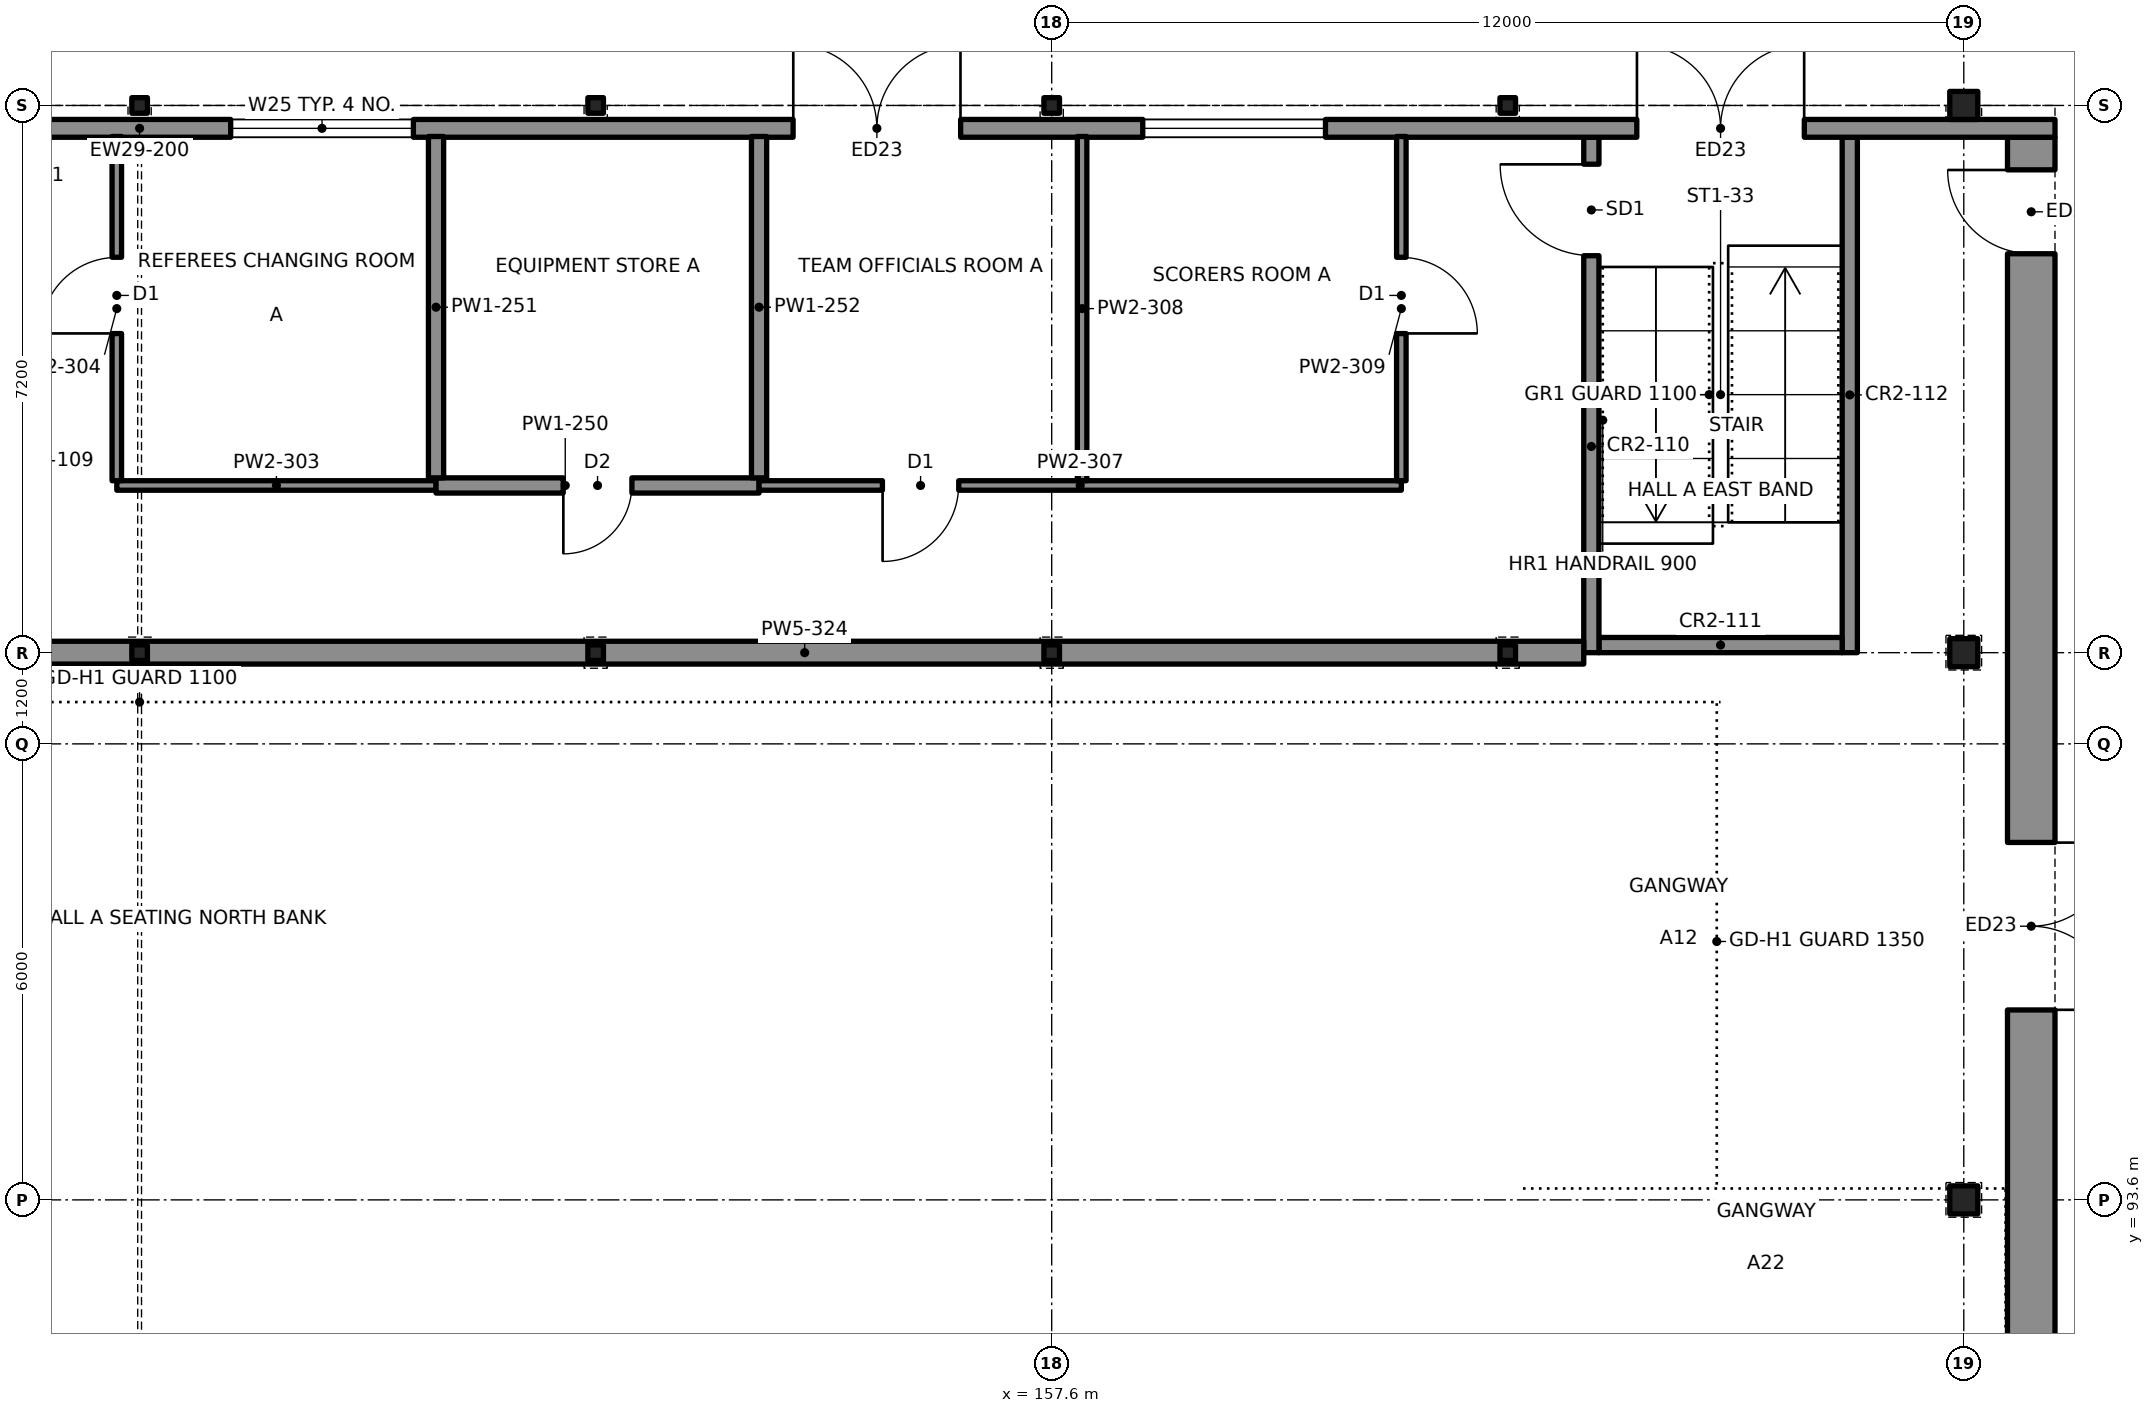
"""IFC4 building model, lengths in metres.
Left out: names, types, materials, properties, quantities, classifications, styles, units other than length and angle.
Written with IfcOpenShell. Run it as: python <this file> out.ifc"""

import sys

from ifc_helpers import new_model, si_unit, direction, frame, frame_2d, origin, origin_2d, place, context, subcontext, project, spatial, rectangle, i_section, extrude, element, fill, save


model = new_model("IFC4")
c1 = context("Model", 3, precision=1e-05, world=origin(), true_north=direction((0.0, 1.0)))
c2 = subcontext(c1, "Body", "Model", "MODEL_VIEW")
j1 = project(units=[si_unit("LENGTHUNIT", "METRE"), si_unit("PLANEANGLEUNIT", "RADIAN")], contexts=[c1])
p1 = place(None, origin())
s1 = spatial("IfcSite", under=j1, at=p1, CompositionType="ELEMENT")
p2 = place(p1, origin())
s2 = spatial("IfcBuilding", under=s1, at=p2, CompositionType="ELEMENT")
p3 = place(p2, origin())
s3 = spatial("IfcBuildingStorey", under=s2, at=p3, CompositionType="ELEMENT", Elevation=0.0)
for number, where, z_axis, x_axis in (
    (1, (169.6, 93.6, -0.5), (0.0, 0.0, 1.0), (1.0, 0.0, 0.0)),
    (2, (169.6, 100.8, -0.5), (0.0, 0.0, 1.0), (1.0, 0.0, 0.0)),
    (3, (169.6, 108.0, -0.5), (0.0, 0.0, 1.0), (1.0, 0.0, 0.0)),
):
    element("IfcColumn", number, at=place(p3, frame(where, z_axis=z_axis, x_axis=x_axis)), inside=s3, PredefinedType="COLUMN", context=c2, shape_type="SweptSolid", body=[
        extrude(i_section(OverallWidth=0.369, OverallDepth=0.356, WebThickness=0.011, FlangeThickness=0.018, at=origin_2d()), origin(), (0.0, 0.0, 1.0), 4.9),
    ])
for number, where, z_axis, x_axis in (
    (4, (145.6, 100.8, -0.5), (0.0, 0.0, 1.0), (1.0, 0.0, 0.0)),
    (5, (145.6, 108.0, -0.5), (0.0, 0.0, 1.0), (1.0, 0.0, 0.0)),
    (6, (151.6, 100.8, -0.5), (0.0, 0.0, 1.0), (1.0, 0.0, 0.0)),
    (7, (151.6, 108.0, -0.5), (0.0, 0.0, 1.0), (1.0, 0.0, 0.0)),
    (8, (157.6, 100.8, -0.5), (0.0, 0.0, 1.0), (1.0, 0.0, 0.0)),
    (9, (157.6, 108.0, -0.5), (0.0, 0.0, 1.0), (1.0, 0.0, 0.0)),
    (10, (163.6, 100.8, -0.5), (0.0, 0.0, 1.0), (1.0, 0.0, 0.0)),
    (11, (163.6, 108.0, -0.5), (0.0, 0.0, 1.0), (1.0, 0.0, 0.0)),
):
    element("IfcColumn", number, at=place(p3, frame(where, z_axis=z_axis, x_axis=x_axis)), inside=s3, PredefinedType="COLUMN", context=c2, shape_type="SweptSolid", body=[
        extrude(i_section(OverallWidth=0.205, OverallDepth=0.31, WebThickness=0.01, FlangeThickness=0.016, at=origin_2d()), origin(), (0.0, 0.0, 1.0), 4.9),
    ])
p4 = place(p3, frame((170.488, 72.418, 0.0), z_axis=(0.0, 0.0, 1.0), x_axis=(0.0, 1.0, 0.0)))
e12 = element("IfcWall", 12, at=p4, inside=s3, PredefinedType="SOLIDWALL", context=c2, shape_type="SweptSolid", body=[
    extrude(rectangle(XDim=35.163, YDim=0.625, at=frame_2d((17.582, 0.0))), origin(), (0.0, 0.0, 1.0), 4.4),
])
p5 = place(p4, frame((23.683, 0.0, 0.0)))
e13 = element("IfcOpeningElement", 13, at=p5, cuts=e12, PredefinedType="OPENING", context=c2, shape_type="SweptSolid", body=[
    extrude(rectangle(XDim=2.2, YDim=2.4, at=frame_2d((1.1, 1.2))), frame((0.0, 0.323, 0.0), z_axis=(0.0, -1.0, 0.0), x_axis=(1.0, 0.0, 0.0)), (0.0, 0.0, 1.0), 0.645),
])
p6 = place(p4, frame((33.633, 0.0, 0.0)))
e14 = element("IfcOpeningElement", 14, at=p6, cuts=e12, PredefinedType="OPENING", context=c2, shape_type="SweptSolid", body=[
    extrude(rectangle(XDim=1.1, YDim=2.4, at=frame_2d((0.55, 1.2))), frame((0.0, 0.323, 0.0), z_axis=(0.0, -1.0, 0.0), x_axis=(1.0, 0.0, 0.0)), (0.0, 0.0, 1.0), 0.645),
])
p7 = place(p3, frame((120.4, 107.699, 0.0), z_axis=(0.0, 0.0, 1.0), x_axis=(1.0, 0.0, 0.0)))
e15 = element("IfcWall", 15, at=p7, inside=s3, PredefinedType="SOLIDWALL", context=c2, shape_type="SweptSolid", body=[
    extrude(rectangle(XDim=50.4, YDim=0.234, at=frame_2d((25.2, 0.0))), origin(), (0.0, 0.0, 1.0), 4.4),
])
p8 = place(p7, frame((9.6, 0.0, 1.0)))
e16 = element("IfcOpeningElement", 16, at=p8, cuts=e15, PredefinedType="OPENING", context=c2, shape_type="SweptSolid", body=[
    extrude(rectangle(XDim=2.4, YDim=2.4, at=frame_2d((1.2, 1.2))), frame((0.0, 0.127, 0.0), z_axis=(0.0, -1.0, 0.0), x_axis=(1.0, 0.0, 0.0)), (0.0, 0.0, 1.0), 0.254),
])
p9 = place(p7, frame((21.6, 0.0, 1.0)))
e17 = element("IfcOpeningElement", 17, at=p9, cuts=e15, PredefinedType="OPENING", context=c2, shape_type="SweptSolid", body=[
    extrude(rectangle(XDim=2.4, YDim=2.4, at=frame_2d((1.2, 1.2))), frame((0.0, 0.127, 0.0), z_axis=(0.0, -1.0, 0.0), x_axis=(1.0, 0.0, 0.0)), (0.0, 0.0, 1.0), 0.254),
])
p10 = place(p7, frame((26.4, 0.0, 1.0)))
e18 = element("IfcOpeningElement", 18, at=p10, cuts=e15, PredefinedType="OPENING", context=c2, shape_type="SweptSolid", body=[
    extrude(rectangle(XDim=2.4, YDim=2.4, at=frame_2d((1.2, 1.2))), frame((0.0, 0.127, 0.0), z_axis=(0.0, -1.0, 0.0), x_axis=(1.0, 0.0, 0.0)), (0.0, 0.0, 1.0), 0.254),
])
p11 = place(p7, frame((38.4, 0.0, 1.0)))
e19 = element("IfcOpeningElement", 19, at=p11, cuts=e15, PredefinedType="OPENING", context=c2, shape_type="SweptSolid", body=[
    extrude(rectangle(XDim=2.4, YDim=2.4, at=frame_2d((1.2, 1.2))), frame((0.0, 0.127, 0.0), z_axis=(0.0, -1.0, 0.0), x_axis=(1.0, 0.0, 0.0)), (0.0, 0.0, 1.0), 0.254),
])
p12 = place(p7, frame((14.4, 0.0, 0.0)))
e20 = element("IfcOpeningElement", 20, at=p12, cuts=e15, PredefinedType="OPENING", context=c2, shape_type="SweptSolid", body=[
    extrude(rectangle(XDim=2.2, YDim=2.4, at=frame_2d((1.1, 1.2))), frame((0.0, 0.127, 0.0), z_axis=(0.0, -1.0, 0.0), x_axis=(1.0, 0.0, 0.0)), (0.0, 0.0, 1.0), 0.254),
])
p13 = place(p7, frame((33.8, 0.0, 0.0)))
e21 = element("IfcOpeningElement", 21, at=p13, cuts=e15, PredefinedType="OPENING", context=c2, shape_type="SweptSolid", body=[
    extrude(rectangle(XDim=2.2, YDim=2.4, at=frame_2d((1.1, 1.2))), frame((0.0, 0.127, 0.0), z_axis=(0.0, -1.0, 0.0), x_axis=(1.0, 0.0, 0.0)), (0.0, 0.0, 1.0), 0.254),
])
p14 = place(p7, frame((2.9, 0.0, 0.0)))
e22 = element("IfcOpeningElement", 22, at=p14, cuts=e15, PredefinedType="OPENING", context=c2, shape_type="SweptSolid", body=[
    extrude(rectangle(XDim=2.2, YDim=2.4, at=frame_2d((1.1, 1.2))), frame((0.0, 0.127, 0.0), z_axis=(0.0, -1.0, 0.0), x_axis=(1.0, 0.0, 0.0)), (0.0, 0.0, 1.0), 0.254),
])
p15 = place(p7, frame((44.9, 0.0, 0.0)))
e23 = element("IfcOpeningElement", 23, at=p15, cuts=e15, PredefinedType="OPENING", context=c2, shape_type="SweptSolid", body=[
    extrude(rectangle(XDim=2.2, YDim=2.4, at=frame_2d((1.1, 1.2))), frame((0.0, 0.127, 0.0), z_axis=(0.0, -1.0, 0.0), x_axis=(1.0, 0.0, 0.0)), (0.0, 0.0, 1.0), 0.254),
])
p16 = place(p3, frame((164.7, 100.8, 0.0), z_axis=(0.0, 0.0, 1.0), x_axis=(0.0, 1.0, 0.0)))
e24 = element("IfcWall", 24, at=p16, inside=s3, PredefinedType="SOLIDWALL", context=c2, shape_type="SweptSolid", body=[
    extrude(rectangle(XDim=6.783, YDim=0.2, at=frame_2d((3.392, 0.0))), origin(), (0.0, 0.0, 1.0), 4.4),
])
p17 = place(p16, frame((5.225, 0.0, 0.0)))
e25 = element("IfcOpeningElement", 25, at=p17, cuts=e24, PredefinedType="OPENING", context=c2, shape_type="SweptSolid", body=[
    extrude(rectangle(XDim=1.2, YDim=2.1, at=frame_2d((0.6, 1.05))), frame((0.0, 0.11, 0.0), z_axis=(0.0, -1.0, 0.0), x_axis=(1.0, 0.0, 0.0)), (0.0, 0.0, 1.0), 0.22),
])
p18 = place(p3, frame((168.1, 100.8, 0.0), z_axis=(0.0, 0.0, 1.0), x_axis=(0.0, 1.0, 0.0)))
e26 = element("IfcWall", 26, at=p18, inside=s3, PredefinedType="SOLIDWALL", context=c2, shape_type="SweptSolid", body=[
    extrude(rectangle(XDim=6.783, YDim=0.2, at=frame_2d((3.392, 0.0))), origin(), (0.0, 0.0, 1.0), 4.4),
])
p19 = place(p3, frame((164.8, 100.9, 0.0), z_axis=(0.0, 0.0, 1.0), x_axis=(1.0, 0.0, 0.0)))
e27 = element("IfcWall", 27, at=p19, inside=s3, PredefinedType="SOLIDWALL", context=c2, shape_type="SweptSolid", body=[
    extrude(rectangle(XDim=3.2, YDim=0.2, at=frame_2d((1.6, 0.0))), origin(), (0.0, 0.0, 1.0), 4.4),
])
p20 = place(p3, frame((144.1, 100.8, 0.0), z_axis=(0.0, 0.0, 1.0), x_axis=(1.0, 0.0, 0.0)))
e28 = element("IfcWall", 28, at=p20, inside=s3, PredefinedType="PARTITIONING", context=c2, shape_type="SweptSolid", body=[
    extrude(rectangle(XDim=20.5, YDim=0.3, at=frame_2d((10.25, 0.0))), origin(), (0.0, 0.0, 1.0), 3.8),
])
p21 = place(p3, frame((145.3, 103.0, 0.0), z_axis=(0.0, 0.0, 1.0), x_axis=(1.0, 0.0, 0.0)))
e29 = element("IfcWall", 29, at=p21, inside=s3, PredefinedType="PARTITIONING", context=c2, shape_type="SweptSolid", body=[
    extrude(rectangle(XDim=4.2, YDim=0.125, at=frame_2d((2.1, 0.0))), origin(), (0.0, 0.0, 1.0), 3.65),
])
p22 = place(p3, frame((149.5, 103.0, 0.0), z_axis=(0.0, 0.0, 1.0), x_axis=(1.0, 0.0, 0.0)))
e30 = element("IfcWall", 30, at=p22, inside=s3, PredefinedType="PARTITIONING", context=c2, shape_type="SweptSolid", body=[
    extrude(rectangle(XDim=4.25, YDim=0.2, at=frame_2d((2.125, 0.0))), origin(), (0.0, 0.0, 1.0), 3.65),
])
p23 = place(p22, frame((1.675, 0.0, 0.0)))
e31 = element("IfcOpeningElement", 31, at=p23, cuts=e30, PredefinedType="OPENING", context=c2, shape_type="SweptSolid", body=[
    extrude(rectangle(XDim=0.9, YDim=2.1, at=frame_2d((0.45, 1.05))), frame((0.0, 0.11, 0.0), z_axis=(0.0, -1.0, 0.0), x_axis=(1.0, 0.0, 0.0)), (0.0, 0.0, 1.0), 0.22),
])
p24 = place(p3, frame((153.75, 103.0, 0.0), z_axis=(0.0, 0.0, 1.0), x_axis=(1.0, 0.0, 0.0)))
e32 = element("IfcWall", 32, at=p24, inside=s3, PredefinedType="PARTITIONING", context=c2, shape_type="SweptSolid", body=[
    extrude(rectangle(XDim=8.45, YDim=0.125, at=frame_2d((4.225, 0.0))), origin(), (0.0, 0.0, 1.0), 3.65),
])
p25 = place(p24, frame((1.625, 0.0, 0.0)))
e33 = element("IfcOpeningElement", 33, at=p25, cuts=e32, PredefinedType="OPENING", context=c2, shape_type="SweptSolid", body=[
    extrude(rectangle(XDim=1.0, YDim=2.1, at=frame_2d((0.5, 1.05))), frame((0.0, 0.073, 0.0), z_axis=(0.0, -1.0, 0.0), x_axis=(1.0, 0.0, 0.0)), (0.0, 0.0, 1.0), 0.145),
])
p26 = place(p3, frame((145.3, 103.062, 0.0), z_axis=(0.0, 0.0, 1.0), x_axis=(0.0, 1.0, 0.0)))
e34 = element("IfcWall", 34, at=p26, inside=s3, PredefinedType="PARTITIONING", context=c2, shape_type="SweptSolid", body=[
    extrude(rectangle(XDim=4.529, YDim=0.125, at=frame_2d((2.265, 0.0))), origin(), (0.0, 0.0, 1.0), 3.65),
])
p27 = place(p26, frame((1.938, 0.0, 0.0)))
e35 = element("IfcOpeningElement", 35, at=p27, cuts=e34, PredefinedType="OPENING", context=c2, shape_type="SweptSolid", body=[
    extrude(rectangle(XDim=1.0, YDim=2.1, at=frame_2d((0.5, 1.05))), frame((0.0, 0.073, 0.0), z_axis=(0.0, -1.0, 0.0), x_axis=(1.0, 0.0, 0.0)), (0.0, 0.0, 1.0), 0.145),
])
for number, where, z_axis, x_axis in (
    (36, (149.5, 103.1, 0.0), (0.0, 0.0, 1.0), (0.0, 1.0, 0.0)),
    (37, (153.75, 103.1, 0.0), (0.0, 0.0, 1.0), (0.0, 1.0, 0.0)),
):
    element("IfcWall", number, at=place(p3, frame(where, z_axis=z_axis, x_axis=x_axis)), inside=s3, PredefinedType="PARTITIONING", context=c2, shape_type="SweptSolid", body=[
        extrude(rectangle(XDim=4.491, YDim=0.2, at=frame_2d((2.246, 0.0))), origin(), (0.0, 0.0, 1.0), 3.65),
    ])
p28 = place(p3, frame((158.0, 103.062, 0.0), z_axis=(0.0, 0.0, 1.0), x_axis=(0.0, 1.0, 0.0)))
e38 = element("IfcWall", 38, at=p28, inside=s3, PredefinedType="PARTITIONING", context=c2, shape_type="SweptSolid", body=[
    extrude(rectangle(XDim=4.529, YDim=0.125, at=frame_2d((2.265, 0.0))), origin(), (0.0, 0.0, 1.0), 3.65),
])
p29 = place(p3, frame((162.2, 103.062, 0.0), z_axis=(0.0, 0.0, 1.0), x_axis=(0.0, 1.0, 0.0)))
e39 = element("IfcWall", 39, at=p29, inside=s3, PredefinedType="PARTITIONING", context=c2, shape_type="SweptSolid", body=[
    extrude(rectangle(XDim=4.529, YDim=0.125, at=frame_2d((2.265, 0.0))), origin(), (0.0, 0.0, 1.0), 3.65),
])
p30 = place(p29, frame((1.938, 0.0, 0.0)))
e40 = element("IfcOpeningElement", 40, at=p30, cuts=e39, PredefinedType="OPENING", context=c2, shape_type="SweptSolid", body=[
    extrude(rectangle(XDim=1.0, YDim=2.1, at=frame_2d((0.5, 1.05))), frame((0.0, 0.073, 0.0), z_axis=(0.0, -1.0, 0.0), x_axis=(1.0, 0.0, 0.0)), (0.0, 0.0, 1.0), 0.145),
])
p31 = place(p5, origin())
e41 = element("IfcDoor", 41, at=p31, inside=s3, OperationType="DOUBLE_DOOR_SINGLE_SWING", PredefinedType="DOOR", context=c2, shape_type="SweptSolid", body=[
    extrude(rectangle(XDim=2.2, YDim=2.4, at=frame_2d((1.1, 1.2))), frame((0.0, 0.025, 0.0), z_axis=(0.0, -1.0, 0.0), x_axis=(1.0, 0.0, 0.0)), (0.0, 0.0, 1.0), 0.05),
])
fill(e13, e41)
p32 = place(p6, origin())
e42 = element("IfcDoor", 42, at=p32, inside=s3, OperationType="SINGLE_SWING_RIGHT", PredefinedType="DOOR", context=c2, shape_type="SweptSolid", body=[
    extrude(rectangle(XDim=1.1, YDim=2.4, at=frame_2d((0.55, 1.2))), frame((0.0, 0.025, 0.0), z_axis=(0.0, -1.0, 0.0), x_axis=(1.0, 0.0, 0.0)), (0.0, 0.0, 1.0), 0.05),
])
fill(e14, e42)
p33 = place(p10, origin())
e43 = element("IfcWindow", 43, at=p33, inside=s3, PartitioningType="SINGLE_PANEL", PredefinedType="WINDOW", context=c2, shape_type="SweptSolid", body=[
    extrude(rectangle(XDim=2.4, YDim=2.4, at=frame_2d((1.2, 1.2))), frame((0.0, 0.03, 0.0), z_axis=(0.0, -1.0, 0.0), x_axis=(1.0, 0.0, 0.0)), (0.0, 0.0, 1.0), 0.06),
])
fill(e18, e43)
p34 = place(p11, origin())
e44 = element("IfcWindow", 44, at=p34, inside=s3, PartitioningType="SINGLE_PANEL", PredefinedType="WINDOW", context=c2, shape_type="SweptSolid", body=[
    extrude(rectangle(XDim=2.4, YDim=2.4, at=frame_2d((1.2, 1.2))), frame((0.0, 0.03, 0.0), z_axis=(0.0, -1.0, 0.0), x_axis=(1.0, 0.0, 0.0)), (0.0, 0.0, 1.0), 0.06),
])
fill(e19, e44)
p35 = place(p13, origin())
e45 = element("IfcDoor", 45, at=p35, inside=s3, OperationType="DOUBLE_DOOR_SINGLE_SWING", PredefinedType="DOOR", context=c2, shape_type="SweptSolid", body=[
    extrude(rectangle(XDim=2.2, YDim=2.4, at=frame_2d((1.1, 1.2))), frame((0.0, 0.025, 0.0), z_axis=(0.0, -1.0, 0.0), x_axis=(1.0, 0.0, 0.0)), (0.0, 0.0, 1.0), 0.05),
])
fill(e21, e45)
p36 = place(p15, origin())
e46 = element("IfcDoor", 46, at=p36, inside=s3, OperationType="DOUBLE_DOOR_SINGLE_SWING", PredefinedType="DOOR", context=c2, shape_type="SweptSolid", body=[
    extrude(rectangle(XDim=2.2, YDim=2.4, at=frame_2d((1.1, 1.2))), frame((0.0, 0.025, 0.0), z_axis=(0.0, -1.0, 0.0), x_axis=(1.0, 0.0, 0.0)), (0.0, 0.0, 1.0), 0.05),
])
fill(e23, e46)
p37 = place(p17, origin())
e47 = element("IfcDoor", 47, at=p37, inside=s3, OperationType="SINGLE_SWING_RIGHT", PredefinedType="DOOR", context=c2, shape_type="SweptSolid", body=[
    extrude(rectangle(XDim=1.2, YDim=2.1, at=frame_2d((0.6, 1.05))), frame((0.0, 0.025, 0.0), z_axis=(0.0, -1.0, 0.0), x_axis=(1.0, 0.0, 0.0)), (0.0, 0.0, 1.0), 0.05),
])
fill(e25, e47)
p38 = place(p27, origin())
e48 = element("IfcDoor", 48, at=p38, inside=s3, OperationType="SINGLE_SWING_LEFT", PredefinedType="DOOR", context=c2, shape_type="SweptSolid", body=[
    extrude(rectangle(XDim=1.0, YDim=2.1, at=frame_2d((0.5, 1.05))), frame((0.0, 0.025, 0.0), z_axis=(0.0, -1.0, 0.0), x_axis=(1.0, 0.0, 0.0)), (0.0, 0.0, 1.0), 0.05),
])
fill(e35, e48)
p39 = place(p23, origin())
e49 = element("IfcDoor", 49, at=p39, inside=s3, OperationType="SINGLE_SWING_LEFT", PredefinedType="DOOR", context=c2, shape_type="SweptSolid", body=[
    extrude(rectangle(XDim=0.9, YDim=2.1, at=frame_2d((0.45, 1.05))), frame((0.0, 0.025, 0.0), z_axis=(0.0, -1.0, 0.0), x_axis=(1.0, 0.0, 0.0)), (0.0, 0.0, 1.0), 0.05),
])
fill(e31, e49)
p40 = place(p25, origin())
e50 = element("IfcDoor", 50, at=p40, inside=s3, OperationType="SINGLE_SWING_LEFT", PredefinedType="DOOR", context=c2, shape_type="SweptSolid", body=[
    extrude(rectangle(XDim=1.0, YDim=2.1, at=frame_2d((0.5, 1.05))), frame((0.0, 0.025, 0.0), z_axis=(0.0, -1.0, 0.0), x_axis=(1.0, 0.0, 0.0)), (0.0, 0.0, 1.0), 0.05),
])
fill(e33, e50)
p41 = place(p30, origin())
e51 = element("IfcDoor", 51, at=p41, inside=s3, OperationType="SINGLE_SWING_LEFT", PredefinedType="DOOR", context=c2, shape_type="SweptSolid", body=[
    extrude(rectangle(XDim=1.0, YDim=2.1, at=frame_2d((0.5, 1.05))), frame((0.0, 0.025, 0.0), z_axis=(0.0, -1.0, 0.0), x_axis=(1.0, 0.0, 0.0)), (0.0, 0.0, 1.0), 0.05),
])
fill(e40, e51)
save(model, sys.argv[1])
